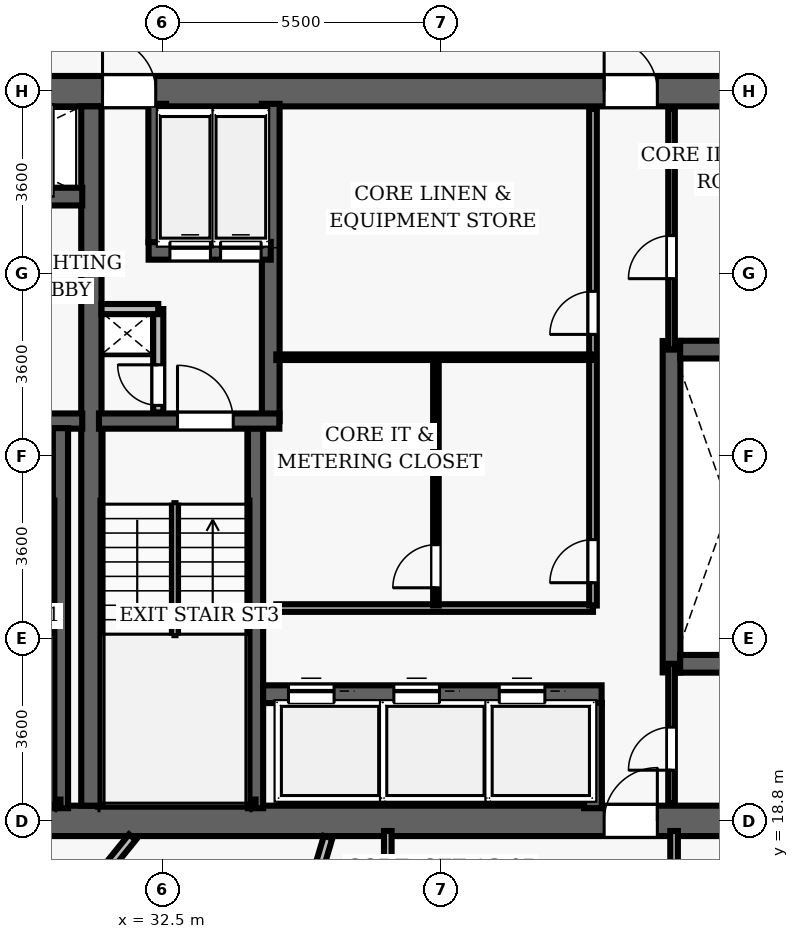
"""IFC4 building model, lengths in metres.
Left out: names, types, materials, properties, quantities, classifications, styles, units other than length and angle.
Written with IfcOpenShell. Run it as: python <this file> out.ifc"""

import sys

from ifc_helpers import new_model, si_unit, direction, frame, frame_2d, origin, place, context, subcontext, project, spatial, rectangle, extrude, element, fill, save


model = new_model("IFC4")
c1 = context("Model", 3, precision=1e-05, world=origin(), true_north=direction((0.0, 1.0)))
c2 = subcontext(c1, "Body", "Model", "MODEL_VIEW")
j1 = project(units=[si_unit("LENGTHUNIT", "METRE"), si_unit("PLANEANGLEUNIT", "RADIAN")], contexts=[c1])
p1 = place(None, origin())
s1 = spatial("IfcSite", under=j1, at=p1, CompositionType="ELEMENT")
p2 = place(p1, origin())
s2 = spatial("IfcBuilding", under=s1, at=p2, CompositionType="ELEMENT")
p3 = place(p2, frame((0.0, 0.0, 123.8)))
s3 = spatial("IfcBuildingStorey", under=s2, at=p3, CompositionType="ELEMENT", Elevation=123.8)
p4 = place(p3, frame((26.7, 18.8, 0.0), z_axis=(0.0, 0.0, 1.0), x_axis=(1.0, 0.0, 0.0)))
e1 = element("IfcWall", 1, at=p4, inside=s3, PredefinedType="SHEAR", context=c2, shape_type="SweptSolid", body=[
    extrude(rectangle(XDim=22.6, YDim=0.6, at=frame_2d((11.3, 0.0))), origin(), (0.0, 0.0, 1.0), 3.5),
])
p5 = place(p4, frame((14.52, 0.0, 0.0)))
e2 = element("IfcOpeningElement", 2, at=p5, cuts=e1, PredefinedType="OPENING", context=c2, shape_type="SweptSolid", body=[
    extrude(rectangle(XDim=1.05, YDim=2.15, at=frame_2d((0.525, 1.075))), frame((0.0, 0.31, 0.0), z_axis=(0.0, -1.0, 0.0), x_axis=(1.0, 0.0, 0.0)), (0.0, 0.0, 1.0), 0.62),
])
p6 = place(p3, frame((26.7, 33.2, 0.0), z_axis=(0.0, 0.0, 1.0), x_axis=(1.0, 0.0, 0.0)))
e3 = element("IfcWall", 3, at=p6, inside=s3, PredefinedType="SHEAR", context=c2, shape_type="SweptSolid", body=[
    extrude(rectangle(XDim=22.6, YDim=0.6, at=frame_2d((11.3, 0.0))), origin(), (0.0, 0.0, 1.0), 3.5),
])
p7 = place(p6, frame((4.62, 0.0, 0.0)))
e4 = element("IfcOpeningElement", 4, at=p7, cuts=e3, PredefinedType="OPENING", context=c2, shape_type="SweptSolid", body=[
    extrude(rectangle(XDim=1.05, YDim=2.15, at=frame_2d((0.525, 1.075))), frame((0.0, 0.31, 0.0), z_axis=(0.0, -1.0, 0.0), x_axis=(1.0, 0.0, 0.0)), (0.0, 0.0, 1.0), 0.62),
])
p8 = place(p6, frame((14.52, 0.0, 0.0)))
e5 = element("IfcOpeningElement", 5, at=p8, cuts=e3, PredefinedType="OPENING", context=c2, shape_type="SweptSolid", body=[
    extrude(rectangle(XDim=1.05, YDim=2.15, at=frame_2d((0.525, 1.075))), frame((0.0, 0.31, 0.0), z_axis=(0.0, -1.0, 0.0), x_axis=(1.0, 0.0, 0.0)), (0.0, 0.0, 1.0), 0.62),
])
p9 = place(p3, frame((31.1, 19.1, 0.0), z_axis=(0.0, 0.0, 1.0), x_axis=(0.0, 1.0, 0.0)))
e6 = element("IfcWall", 6, at=p9, inside=s3, PredefinedType="SHEAR", context=c2, shape_type="SweptSolid", body=[
    extrude(rectangle(XDim=13.8, YDim=0.4, at=frame_2d((6.9, 0.0))), origin(), (0.0, 0.0, 1.0), 3.5),
])
p10 = place(p3, frame((27.25, 26.69, 0.0), z_axis=(0.0, 0.0, 1.0), x_axis=(1.0, 0.0, 0.0)))
e7 = element("IfcWall", 7, at=p10, inside=s3, PredefinedType="SHEAR", context=c2, shape_type="SweptSolid", body=[
    extrude(rectangle(XDim=3.67, YDim=0.3, at=frame_2d((1.835, 0.0))), origin(), (0.0, 0.0, 1.0), 3.5),
])
p11 = place(p10, frame((1.05, 0.0, 0.0)))
e8 = element("IfcOpeningElement", 8, at=p11, cuts=e7, PredefinedType="OPENING", context=c2, shape_type="SweptSolid", body=[
    extrude(rectangle(XDim=1.1, YDim=2.15, at=frame_2d((0.55, 1.075))), frame((0.0, 0.16, 0.0), z_axis=(0.0, -1.0, 0.0), x_axis=(1.0, 0.0, 0.0)), (0.0, 0.0, 1.0), 0.32),
])
p12 = place(p3, frame((30.49, 19.05, 0.0), z_axis=(0.0, 0.0, 1.0), x_axis=(0.0, 1.0, 0.0)))
e9 = element("IfcWall", 9, at=p12, inside=s3, PredefinedType="SHEAR", context=c2, shape_type="SweptSolid", body=[
    extrude(rectangle(XDim=7.5, YDim=0.3, at=frame_2d((3.75, 0.0))), origin(), (0.0, 0.0, 1.0), 3.5),
])
p13 = place(p3, frame((27.395, 19.16, 0.0), z_axis=(0.0, 0.0, 1.0), x_axis=(1.0, 0.0, 0.0)))
e10 = element("IfcWall", 10, at=p13, inside=s3, PredefinedType="SHEAR", context=c2, shape_type="SweptSolid", body=[
    extrude(rectangle(XDim=3.095, YDim=0.12, at=frame_2d((1.547, 0.0))), origin(), (0.0, 0.0, 1.0), 3.5),
])
p14 = place(p3, frame((27.25, 31.12, 0.0), z_axis=(0.0, 0.0, 1.0), x_axis=(1.0, 0.0, 0.0)))
e11 = element("IfcWall", 11, at=p14, inside=s3, PredefinedType="SHEAR", context=c2, shape_type="SweptSolid", body=[
    extrude(rectangle(XDim=3.67, YDim=0.35, at=frame_2d((1.835, 0.0))), origin(), (0.0, 0.0, 1.0), 2.675),
])
p15 = place(p14, frame((1.25, 0.0, 0.0)))
e12 = element("IfcOpeningElement", 12, at=p15, cuts=e11, PredefinedType="OPENING", context=c2, shape_type="SweptSolid", body=[
    extrude(rectangle(XDim=1.1, YDim=2.15, at=frame_2d((0.55, 1.075))), frame((0.0, 0.185, 0.0), z_axis=(0.0, -1.0, 0.0), x_axis=(1.0, 0.0, 0.0)), (0.0, 0.0, 1.0), 0.37),
])
p16 = place(p3, frame((34.34, 19.05, 0.0), z_axis=(0.0, 0.0, 1.0), x_axis=(0.0, 1.0, 0.0)))
e13 = element("IfcWall", 13, at=p16, inside=s3, PredefinedType="SHEAR", context=c2, shape_type="SweptSolid", body=[
    extrude(rectangle(XDim=7.5, YDim=0.3, at=frame_2d((3.75, 0.0))), origin(), (0.0, 0.0, 1.0), 3.5),
])
p17 = place(p3, frame((34.64, 26.69, 0.0), z_axis=(0.0, 0.0, 1.0), x_axis=(0.0, 1.0, 0.0)))
e14 = element("IfcWall", 14, at=p17, inside=s3, PredefinedType="SHEAR", context=c2, shape_type="SweptSolid", body=[
    extrude(rectangle(XDim=6.26, YDim=0.35, at=frame_2d((3.13, 0.0))), origin(), (0.0, 0.0, 1.0), 3.5),
])
p18 = place(p3, frame((31.25, 26.69, 0.0), z_axis=(0.0, 0.0, 1.0), x_axis=(1.0, 0.0, 0.0)))
e15 = element("IfcWall", 15, at=p18, inside=s3, PredefinedType="SHEAR", context=c2, shape_type="SweptSolid", body=[
    extrude(rectangle(XDim=3.56, YDim=0.3, at=frame_2d((1.78, 0.0))), origin(), (0.0, 0.0, 1.0), 3.5),
])
p19 = place(p18, frame((1.55, 0.0, 0.0)))
e16 = element("IfcOpeningElement", 16, at=p19, cuts=e15, PredefinedType="OPENING", context=c2, shape_type="SweptSolid", body=[
    extrude(rectangle(XDim=1.1, YDim=2.15, at=frame_2d((0.55, 1.075))), frame((0.0, 0.16, 0.0), z_axis=(0.0, -1.0, 0.0), x_axis=(1.0, 0.0, 0.0)), (0.0, 0.0, 1.0), 0.32),
])
p20 = place(p3, frame((31.3, 19.16, 0.0), z_axis=(0.0, 0.0, 1.0), x_axis=(1.0, 0.0, 0.0)))
e17 = element("IfcWall", 17, at=p20, inside=s3, PredefinedType="SHEAR", context=c2, shape_type="SweptSolid", body=[
    extrude(rectangle(XDim=3.04, YDim=0.12, at=frame_2d((1.52, 0.0))), origin(), (0.0, 0.0, 1.0), 3.5),
])
p21 = place(p3, frame((32.23, 30.05, 0.0), z_axis=(0.0, 0.0, 1.0), x_axis=(1.0, 0.0, 0.0)))
e18 = element("IfcWall", 18, at=p21, inside=s3, PredefinedType="SHEAR", context=c2, shape_type="SweptSolid", body=[
    extrude(rectangle(XDim=2.41, YDim=0.35, at=frame_2d((1.205, 0.0))), origin(), (0.0, 0.0, 1.0), 2.675),
])
p22 = place(p21, frame((0.42, 0.0, 0.0)))
e19 = element("IfcOpeningElement", 19, at=p22, cuts=e18, PredefinedType="OPENING", context=c2, shape_type="SweptSolid", body=[
    extrude(rectangle(XDim=0.8, YDim=2.15, at=frame_2d((0.4, 1.075))), frame((0.0, 0.185, 0.0), z_axis=(0.0, -1.0, 0.0), x_axis=(1.0, 0.0, 0.0)), (0.0, 0.0, 1.0), 0.37),
])
p23 = place(p21, frame((1.42, 0.0, 0.0)))
e20 = element("IfcOpeningElement", 20, at=p23, cuts=e18, PredefinedType="OPENING", context=c2, shape_type="SweptSolid", body=[
    extrude(rectangle(XDim=0.8, YDim=2.15, at=frame_2d((0.4, 1.075))), frame((0.0, 0.185, 0.0), z_axis=(0.0, -1.0, 0.0), x_axis=(1.0, 0.0, 0.0)), (0.0, 0.0, 1.0), 0.37),
])
p24 = place(p3, frame((32.4, 30.22, 0.0), z_axis=(0.0, 0.0, 1.0), x_axis=(0.0, 1.0, 0.0)))
e21 = element("IfcWall", 21, at=p24, inside=s3, PredefinedType="SHEAR", context=c2, shape_type="SweptSolid", body=[
    extrude(rectangle(XDim=2.73, YDim=0.35, at=frame_2d((1.365, 0.0))), origin(), (0.0, 0.0, 1.0), 2.675),
])
p25 = place(p3, frame((32.42, 26.86, 0.0), z_axis=(0.0, 0.0, 1.0), x_axis=(0.0, 1.0, 0.0)))
e22 = element("IfcWall", 22, at=p25, inside=s3, PredefinedType="PARTITIONING", context=c2, shape_type="SweptSolid", body=[
    extrude(rectangle(XDim=2.04, YDim=0.2, at=frame_2d((1.02, 0.0))), origin(), (0.0, 0.0, 1.0), 2.675),
])
p26 = place(p25, frame((0.14, 0.0, 0.0)))
e23 = element("IfcOpeningElement", 23, at=p26, cuts=e22, PredefinedType="OPENING", context=c2, shape_type="SweptSolid", body=[
    extrude(rectangle(XDim=0.8, YDim=2.05, at=frame_2d((0.4, 1.025))), frame((0.0, 0.11, 0.0), z_axis=(0.0, -1.0, 0.0), x_axis=(1.0, 0.0, 0.0)), (0.0, 0.0, 1.0), 0.22),
])
p27 = place(p3, frame((31.3, 28.9, 0.0), z_axis=(0.0, 0.0, 1.0), x_axis=(1.0, 0.0, 0.0)))
e24 = element("IfcWall", 24, at=p27, inside=s3, PredefinedType="PARTITIONING", context=c2, shape_type="SweptSolid", body=[
    extrude(rectangle(XDim=1.12, YDim=0.2, at=frame_2d((0.56, 0.0))), origin(), (0.0, 0.0, 1.0), 2.675),
])
p28 = place(p3, frame((42.55, 21.73, 0.0), z_axis=(0.0, 0.0, 1.0), x_axis=(0.0, 1.0, 0.0)))
e25 = element("IfcWall", 25, at=p28, inside=s3, PredefinedType="SHEAR", context=c2, shape_type="SweptSolid", body=[
    extrude(rectangle(XDim=6.54, YDim=0.35, at=frame_2d((3.27, 0.0))), origin(), (0.0, 0.0, 1.0), 2.675),
])
for number, where, z_axis, x_axis in (
    (26, (42.72, 21.9, 0.0), (0.0, 0.0, 1.0), (1.0, 0.0, 0.0)),
    (27, (42.72, 28.1, 0.0), (0.0, 0.0, 1.0), (1.0, 0.0, 0.0)),
):
    element("IfcWall", number, at=place(p3, frame(where, z_axis=z_axis, x_axis=x_axis)), inside=s3, PredefinedType="SHEAR", context=c2, shape_type="SweptSolid", body=[
        extrude(rectangle(XDim=2.03, YDim=0.35, at=frame_2d((1.015, 0.0))), origin(), (0.0, 0.0, 1.0), 2.675),
    ])
p29 = place(p3, frame((34.49, 21.3, 0.0), z_axis=(0.0, 0.0, 1.0), x_axis=(1.0, 0.0, 0.0)))
e28 = element("IfcWall", 28, at=p29, inside=s3, PredefinedType="SHEAR", context=c2, shape_type="SweptSolid", body=[
    extrude(rectangle(XDim=6.68, YDim=0.35, at=frame_2d((3.34, 0.0))), origin(), (0.0, 0.0, 1.0), 2.675),
])
p30 = place(p29, frame((0.5, 0.0, 0.0)))
e29 = element("IfcOpeningElement", 29, at=p30, cuts=e28, PredefinedType="OPENING", context=c2, shape_type="SweptSolid", body=[
    extrude(rectangle(XDim=0.9, YDim=2.15, at=frame_2d((0.45, 1.075))), frame((0.0, 0.185, 0.0), z_axis=(0.0, -1.0, 0.0), x_axis=(1.0, 0.0, 0.0)), (0.0, 0.0, 1.0), 0.37),
])
p31 = place(p29, frame((2.58, 0.0, 0.0)))
e30 = element("IfcOpeningElement", 30, at=p31, cuts=e28, PredefinedType="OPENING", context=c2, shape_type="SweptSolid", body=[
    extrude(rectangle(XDim=0.9, YDim=2.15, at=frame_2d((0.45, 1.075))), frame((0.0, 0.185, 0.0), z_axis=(0.0, -1.0, 0.0), x_axis=(1.0, 0.0, 0.0)), (0.0, 0.0, 1.0), 0.37),
])
p32 = place(p29, frame((4.66, 0.0, 0.0)))
e31 = element("IfcOpeningElement", 31, at=p32, cuts=e28, PredefinedType="OPENING", context=c2, shape_type="SweptSolid", body=[
    extrude(rectangle(XDim=0.9, YDim=2.15, at=frame_2d((0.45, 1.075))), frame((0.0, 0.185, 0.0), z_axis=(0.0, -1.0, 0.0), x_axis=(1.0, 0.0, 0.0)), (0.0, 0.0, 1.0), 0.37),
])
p33 = place(p3, frame((41.0, 19.05, 0.0), z_axis=(0.0, 0.0, 1.0), x_axis=(0.0, 1.0, 0.0)))
e32 = element("IfcWall", 32, at=p33, inside=s3, PredefinedType="SHEAR", context=c2, shape_type="SweptSolid", body=[
    extrude(rectangle(XDim=2.08, YDim=0.35, at=frame_2d((1.04, 0.0))), origin(), (0.0, 0.0, 1.0), 2.675),
])
p34 = place(p3, frame((34.75, 23.0, 0.0), z_axis=(0.0, 0.0, 1.0), x_axis=(1.0, 0.0, 0.0)))
e33 = element("IfcWall", 33, at=p34, inside=s3, PredefinedType="PARTITIONING", context=c2, shape_type="SweptSolid", body=[
    extrude(rectangle(XDim=6.25, YDim=0.15, at=frame_2d((3.125, 0.0))), origin(), (0.0, 0.0, 1.0), 2.675),
])
p35 = place(p3, frame((41.0, 23.05, 0.0), z_axis=(0.0, 0.0, 1.0), x_axis=(0.0, 1.0, 0.0)))
e34 = element("IfcWall", 34, at=p35, inside=s3, PredefinedType="PARTITIONING", context=c2, shape_type="SweptSolid", body=[
    extrude(rectangle(XDim=9.8, YDim=0.15, at=frame_2d((4.9, 0.0))), origin(), (0.0, 0.0, 1.0), 2.675),
])
p36 = place(p35, frame((5.35, 0.0, 0.0)))
e35 = element("IfcOpeningElement", 35, at=p36, cuts=e34, PredefinedType="OPENING", context=c2, shape_type="SweptSolid", body=[
    extrude(rectangle(XDim=0.85, YDim=2.1, at=frame_2d((0.425, 1.05))), frame((0.0, 0.085, 0.0), z_axis=(0.0, -1.0, 0.0), x_axis=(1.0, 0.0, 0.0)), (0.0, 0.0, 1.0), 0.17),
])
p37 = place(p35, frame((0.45, 0.0, 0.0)))
e36 = element("IfcOpeningElement", 36, at=p37, cuts=e34, PredefinedType="OPENING", context=c2, shape_type="SweptSolid", body=[
    extrude(rectangle(XDim=0.85, YDim=2.1, at=frame_2d((0.425, 1.05))), frame((0.0, 0.085, 0.0), z_axis=(0.0, -1.0, 0.0), x_axis=(1.0, 0.0, 0.0)), (0.0, 0.0, 1.0), 0.17),
])
p38 = place(p3, frame((34.75, 27.95, 0.0), z_axis=(0.0, 0.0, 1.0), x_axis=(1.0, 0.0, 0.0)))
e37 = element("IfcWall", 37, at=p38, inside=s3, PredefinedType="PARTITIONING", context=c2, shape_type="SweptSolid", body=[
    extrude(rectangle(XDim=6.25, YDim=0.11, at=frame_2d((3.125, 0.0))), origin(), (0.0, 0.0, 1.0), 2.675),
])
p39 = place(p3, frame((37.9, 23.05, 0.0), z_axis=(0.0, 0.0, 1.0), x_axis=(0.0, 1.0, 0.0)))
e38 = element("IfcWall", 38, at=p39, inside=s3, PredefinedType="PARTITIONING", context=c2, shape_type="SweptSolid", body=[
    extrude(rectangle(XDim=4.9, YDim=0.11, at=frame_2d((2.45, 0.0))), origin(), (0.0, 0.0, 1.0), 2.675),
])
p40 = place(p39, frame((0.35, 0.0, 0.0)))
e39 = element("IfcOpeningElement", 39, at=p40, cuts=e38, PredefinedType="OPENING", context=c2, shape_type="SweptSolid", body=[
    extrude(rectangle(XDim=0.85, YDim=2.1, at=frame_2d((0.425, 1.05))), frame((0.0, 0.065, 0.0), z_axis=(0.0, -1.0, 0.0), x_axis=(1.0, 0.0, 0.0)), (0.0, 0.0, 1.0), 0.13),
])
p41 = place(p3, frame((42.55, 28.1, 0.0), z_axis=(0.0, 0.0, 1.0), x_axis=(0.0, 1.0, 0.0)))
e40 = element("IfcWall", 40, at=p41, inside=s3, PredefinedType="PARTITIONING", context=c2, shape_type="SweptSolid", body=[
    extrude(rectangle(XDim=4.75, YDim=0.13, at=frame_2d((2.375, 0.0))), origin(), (0.0, 0.0, 1.0), 2.675),
])
p42 = place(p41, frame((1.4, 0.0, 0.0)))
e41 = element("IfcOpeningElement", 41, at=p42, cuts=e40, PredefinedType="OPENING", context=c2, shape_type="SweptSolid", body=[
    extrude(rectangle(XDim=0.85, YDim=2.1, at=frame_2d((0.425, 1.05))), frame((0.0, 0.075, 0.0), z_axis=(0.0, -1.0, 0.0), x_axis=(1.0, 0.0, 0.0)), (0.0, 0.0, 1.0), 0.15),
])
p43 = place(p3, frame((42.55, 19.15, 0.0), z_axis=(0.0, 0.0, 1.0), x_axis=(0.0, 1.0, 0.0)))
e42 = element("IfcWall", 42, at=p43, inside=s3, PredefinedType="PARTITIONING", context=c2, shape_type="SweptSolid", body=[
    extrude(rectangle(XDim=2.75, YDim=0.13, at=frame_2d((1.375, 0.0))), origin(), (0.0, 0.0, 1.0), 2.675),
])
p44 = place(p43, frame((0.65, 0.0, 0.0)))
e43 = element("IfcOpeningElement", 43, at=p44, cuts=e42, PredefinedType="OPENING", context=c2, shape_type="SweptSolid", body=[
    extrude(rectangle(XDim=0.85, YDim=2.1, at=frame_2d((0.425, 1.05))), frame((0.0, 0.075, 0.0), z_axis=(0.0, -1.0, 0.0), x_axis=(1.0, 0.0, 0.0)), (0.0, 0.0, 1.0), 0.15),
])
p45 = place(p3, frame((36.95, 11.2, 0.0), z_axis=(0.0, 0.0, 1.0), x_axis=(0.0, 1.0, 0.0)))
e44 = element("IfcWall", 44, at=p45, inside=s3, PredefinedType="PARTITIONING", context=c2, shape_type="SweptSolid", body=[
    extrude(rectangle(XDim=7.4, YDim=0.15, at=frame_2d((3.7, 0.0))), origin(), (0.0, 0.0, 1.0), 2.675),
])
p46 = place(p45, frame((5.075, 0.0, 0.0)))
e45 = element("IfcOpeningElement", 45, at=p46, cuts=e44, PredefinedType="OPENING", context=c2, shape_type="SweptSolid", body=[
    extrude(rectangle(XDim=0.95, YDim=2.15, at=frame_2d((0.475, 1.075))), frame((0.0, 0.085, 0.0), z_axis=(0.0, -1.0, 0.0), x_axis=(1.0, 0.0, 0.0)), (0.0, 0.0, 1.0), 0.17),
])
p47 = place(p3, frame((42.6, 16.65, 0.0), z_axis=(0.0, 0.0, 1.0), x_axis=(0.0, 1.0, 0.0)))
e46 = element("IfcWall", 46, at=p47, inside=s3, PredefinedType="PARTITIONING", context=c2, shape_type="SweptSolid", body=[
    extrude(rectangle(XDim=1.95, YDim=0.15, at=frame_2d((0.975, 0.0))), origin(), (0.0, 0.0, 1.0), 2.675),
])
p48 = place(p3, frame((31.91, 18.48, 0.0), z_axis=(0.0, 0.0, 1.0), x_axis=(-0.629315289337, -0.777150092715, 0.0)))
e47 = element("IfcWall", 47, at=p48, inside=s3, PredefinedType="PARTITIONING", context=c2, shape_type="SweptSolid", body=[
    extrude(rectangle(XDim=13.738, YDim=0.175, at=frame_2d((6.869, 0.0))), origin(), (0.0, 0.0, 1.0), 2.675),
])
p49 = place(p3, frame((35.772, 18.48, 0.0), z_axis=(0.0, 0.0, 1.0), x_axis=(-0.284008430424, -0.958821782944, 0.0)))
e48 = element("IfcWall", 48, at=p49, inside=s3, PredefinedType="PARTITIONING", context=c2, shape_type="SweptSolid", body=[
    extrude(rectangle(XDim=15.085, YDim=0.175, at=frame_2d((7.543, 0.0))), origin(), (0.0, 0.0, 1.0), 2.675),
])
p50 = place(p19, origin())
e49 = element("IfcDoor", 49, at=p50, inside=s3, OperationType="SINGLE_SWING_LEFT", PredefinedType="DOOR", context=c2, shape_type="SweptSolid", body=[
    extrude(rectangle(XDim=1.1, YDim=2.15, at=frame_2d((0.55, 1.075))), frame((0.0, 0.025, 0.0), z_axis=(0.0, -1.0, 0.0), x_axis=(1.0, 0.0, 0.0)), (0.0, 0.0, 1.0), 0.05),
])
fill(e16, e49)
p51 = place(p26, origin())
e50 = element("IfcDoor", 50, at=p51, inside=s3, OperationType="SINGLE_SWING_RIGHT", PredefinedType="DOOR", context=c2, shape_type="SweptSolid", body=[
    extrude(rectangle(XDim=0.8, YDim=2.05, at=frame_2d((0.4, 1.025))), frame((0.0, 0.025, 0.0), z_axis=(0.0, -1.0, 0.0), x_axis=(1.0, 0.0, 0.0)), (0.0, 0.0, 1.0), 0.05),
])
fill(e23, e50)
p52 = place(p7, origin())
e51 = element("IfcDoor", 51, at=p52, inside=s3, OperationType="SINGLE_SWING_LEFT", PredefinedType="DOOR", context=c2, shape_type="SweptSolid", body=[
    extrude(rectangle(XDim=1.05, YDim=2.15, at=frame_2d((0.525, 1.075))), frame((0.0, 0.025, 0.0), z_axis=(0.0, -1.0, 0.0), x_axis=(1.0, 0.0, 0.0)), (0.0, 0.0, 1.0), 0.05),
])
fill(e4, e51)
p53 = place(p8, origin())
e52 = element("IfcDoor", 52, at=p53, inside=s3, OperationType="SINGLE_SWING_LEFT", PredefinedType="DOOR", context=c2, shape_type="SweptSolid", body=[
    extrude(rectangle(XDim=1.05, YDim=2.15, at=frame_2d((0.525, 1.075))), frame((0.0, 0.025, 0.0), z_axis=(0.0, -1.0, 0.0), x_axis=(1.0, 0.0, 0.0)), (0.0, 0.0, 1.0), 0.05),
])
fill(e5, e52)
p54 = place(p5, origin())
e53 = element("IfcDoor", 53, at=p54, inside=s3, OperationType="SINGLE_SWING_RIGHT", PredefinedType="DOOR", context=c2, shape_type="SweptSolid", body=[
    extrude(rectangle(XDim=1.05, YDim=2.15, at=frame_2d((0.525, 1.075))), frame((0.0, 0.025, 0.0), z_axis=(0.0, -1.0, 0.0), x_axis=(1.0, 0.0, 0.0)), (0.0, 0.0, 1.0), 0.05),
])
fill(e2, e53)
p55 = place(p36, origin())
e54 = element("IfcDoor", 54, at=p55, inside=s3, OperationType="SINGLE_SWING_LEFT", PredefinedType="DOOR", context=c2, shape_type="SweptSolid", body=[
    extrude(rectangle(XDim=0.85, YDim=2.1, at=frame_2d((0.425, 1.05))), frame((0.0, 0.025, 0.0), z_axis=(0.0, -1.0, 0.0), x_axis=(1.0, 0.0, 0.0)), (0.0, 0.0, 1.0), 0.05),
])
fill(e35, e54)
p56 = place(p37, origin())
e55 = element("IfcDoor", 55, at=p56, inside=s3, OperationType="SINGLE_SWING_LEFT", PredefinedType="DOOR", context=c2, shape_type="SweptSolid", body=[
    extrude(rectangle(XDim=0.85, YDim=2.1, at=frame_2d((0.425, 1.05))), frame((0.0, 0.025, 0.0), z_axis=(0.0, -1.0, 0.0), x_axis=(1.0, 0.0, 0.0)), (0.0, 0.0, 1.0), 0.05),
])
fill(e36, e55)
p57 = place(p40, origin())
e56 = element("IfcDoor", 56, at=p57, inside=s3, OperationType="SINGLE_SWING_LEFT", PredefinedType="DOOR", context=c2, shape_type="SweptSolid", body=[
    extrude(rectangle(XDim=0.85, YDim=2.1, at=frame_2d((0.425, 1.05))), frame((0.0, 0.025, 0.0), z_axis=(0.0, -1.0, 0.0), x_axis=(1.0, 0.0, 0.0)), (0.0, 0.0, 1.0), 0.05),
])
fill(e39, e56)
p58 = place(p42, origin())
e57 = element("IfcDoor", 57, at=p58, inside=s3, OperationType="SINGLE_SWING_LEFT", PredefinedType="DOOR", context=c2, shape_type="SweptSolid", body=[
    extrude(rectangle(XDim=0.85, YDim=2.1, at=frame_2d((0.425, 1.05))), frame((0.0, 0.025, 0.0), z_axis=(0.0, -1.0, 0.0), x_axis=(1.0, 0.0, 0.0)), (0.0, 0.0, 1.0), 0.05),
])
fill(e41, e57)
p59 = place(p44, origin())
e58 = element("IfcDoor", 58, at=p59, inside=s3, OperationType="SINGLE_SWING_LEFT", PredefinedType="DOOR", context=c2, shape_type="SweptSolid", body=[
    extrude(rectangle(XDim=0.85, YDim=2.1, at=frame_2d((0.425, 1.05))), frame((0.0, 0.025, 0.0), z_axis=(0.0, -1.0, 0.0), x_axis=(1.0, 0.0, 0.0)), (0.0, 0.0, 1.0), 0.05),
])
fill(e43, e58)
p60 = place(p30, origin())
e59 = element("IfcDoor", 59, at=p60, inside=s3, OperationType="SLIDING_TO_LEFT", PredefinedType="DOOR", context=c2, shape_type="SweptSolid", body=[
    extrude(rectangle(XDim=0.9, YDim=2.15, at=frame_2d((0.45, 1.075))), frame((0.0, 0.025, 0.0), z_axis=(0.0, -1.0, 0.0), x_axis=(1.0, 0.0, 0.0)), (0.0, 0.0, 1.0), 0.05),
])
fill(e29, e59)
p61 = place(p31, origin())
e60 = element("IfcDoor", 60, at=p61, inside=s3, OperationType="SLIDING_TO_LEFT", PredefinedType="DOOR", context=c2, shape_type="SweptSolid", body=[
    extrude(rectangle(XDim=0.9, YDim=2.15, at=frame_2d((0.45, 1.075))), frame((0.0, 0.025, 0.0), z_axis=(0.0, -1.0, 0.0), x_axis=(1.0, 0.0, 0.0)), (0.0, 0.0, 1.0), 0.05),
])
fill(e30, e60)
p62 = place(p32, origin())
e61 = element("IfcDoor", 61, at=p62, inside=s3, OperationType="SLIDING_TO_LEFT", PredefinedType="DOOR", context=c2, shape_type="SweptSolid", body=[
    extrude(rectangle(XDim=0.9, YDim=2.15, at=frame_2d((0.45, 1.075))), frame((0.0, 0.025, 0.0), z_axis=(0.0, -1.0, 0.0), x_axis=(1.0, 0.0, 0.0)), (0.0, 0.0, 1.0), 0.05),
])
fill(e31, e61)
p63 = place(p22, origin())
e62 = element("IfcDoor", 62, at=p63, inside=s3, OperationType="SLIDING_TO_LEFT", PredefinedType="DOOR", context=c2, shape_type="SweptSolid", body=[
    extrude(rectangle(XDim=0.8, YDim=2.15, at=frame_2d((0.4, 1.075))), frame((0.0, 0.025, 0.0), z_axis=(0.0, -1.0, 0.0), x_axis=(1.0, 0.0, 0.0)), (0.0, 0.0, 1.0), 0.05),
])
fill(e19, e62)
p64 = place(p23, origin())
e63 = element("IfcDoor", 63, at=p64, inside=s3, OperationType="SLIDING_TO_LEFT", PredefinedType="DOOR", context=c2, shape_type="SweptSolid", body=[
    extrude(rectangle(XDim=0.8, YDim=2.15, at=frame_2d((0.4, 1.075))), frame((0.0, 0.025, 0.0), z_axis=(0.0, -1.0, 0.0), x_axis=(1.0, 0.0, 0.0)), (0.0, 0.0, 1.0), 0.05),
])
fill(e20, e63)
save(model, sys.argv[1])
